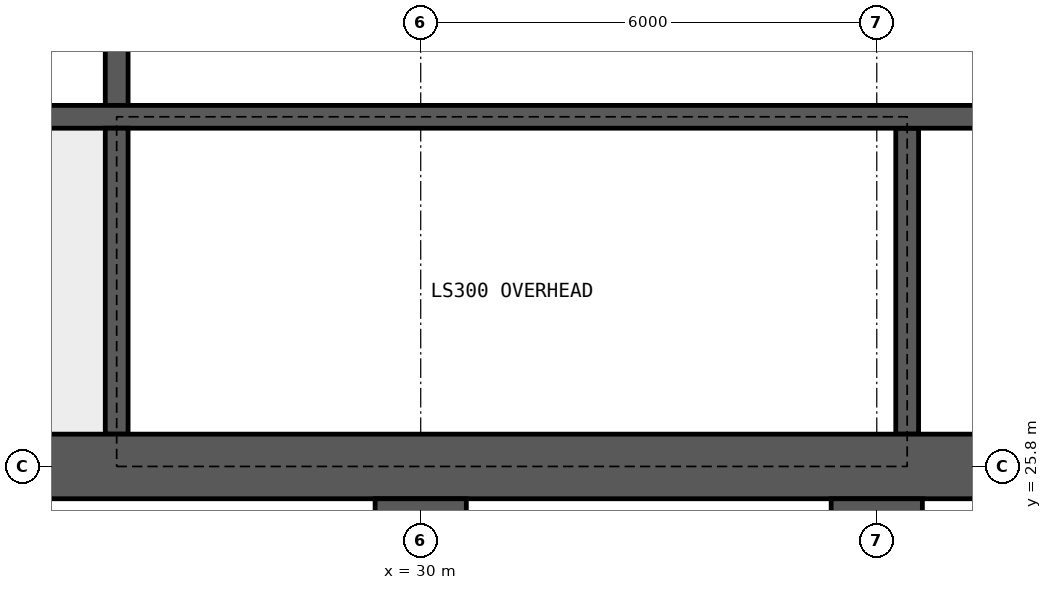
"""IFC4 building model, lengths in metres.
Left out: names, types, materials, properties, quantities, classifications, styles, units other than length and angle.
Written with IfcOpenShell. Run it as: python <this file> out.ifc"""

import sys

from ifc_helpers import new_model, si_unit, direction, frame, frame_2d, origin, place, context, subcontext, project, spatial, rectangle, extrude, element, save


model = new_model("IFC4")
c1 = context("Model", 3, precision=1e-05, world=origin(), true_north=direction((0.0, 1.0)))
c2 = subcontext(c1, "Body", "Model", "MODEL_VIEW")
j1 = project(units=[si_unit("LENGTHUNIT", "METRE"), si_unit("PLANEANGLEUNIT", "RADIAN")], contexts=[c1])
p1 = place(None, origin())
s1 = spatial("IfcSite", under=j1, at=p1, CompositionType="ELEMENT")
p2 = place(p1, origin())
s2 = spatial("IfcBuilding", under=s1, at=p2, CompositionType="ELEMENT")
p3 = place(p2, frame((0.0, 0.0, 201.1)))
s3 = spatial("IfcBuildingStorey", under=s2, at=p3, CompositionType="ELEMENT", Elevation=201.1)
p4 = place(p3, frame((18.0, 25.8, 0.0), z_axis=(0.0, 0.0, 1.0), x_axis=(1.0, 0.0, 0.0)))
e1 = element("IfcWall", 1, at=p4, inside=s3, PredefinedType="SHEAR", context=c2, shape_type="SweptSolid", body=[
    extrude(rectangle(XDim=48.0, YDim=0.85, at=frame_2d((24.0, 0.0))), origin(), (0.0, 0.0, 1.0), 7.2),
])
p5 = place(p3, frame((18.425, 30.4, 0.0), z_axis=(0.0, 0.0, 1.0), x_axis=(1.0, 0.0, 0.0)))
e2 = element("IfcWall", 2, at=p5, inside=s3, PredefinedType="SHEAR", context=c2, shape_type="SweptSolid", body=[
    extrude(rectangle(XDim=47.15, YDim=0.3, at=frame_2d((23.575, 0.0))), origin(), (0.0, 0.0, 1.0), 7.2),
])
p6 = place(p5, frame((0.4, 0.0, 0.0)))
e3 = element("IfcOpeningElement", 3, at=p6, cuts=e2, PredefinedType="OPENING", context=c2, shape_type="SweptSolid", body=[
    extrude(rectangle(XDim=1.0, YDim=2.1, at=frame_2d((0.5, 1.05))), frame((0.0, 0.16, 0.0), z_axis=(0.0, -1.0, 0.0), x_axis=(1.0, 0.0, 0.0)), (0.0, 0.0, 1.0), 0.32),
])
p7 = place(p5, frame((45.75, 0.0, 0.0)))
e4 = element("IfcOpeningElement", 4, at=p7, cuts=e2, PredefinedType="OPENING", context=c2, shape_type="SweptSolid", body=[
    extrude(rectangle(XDim=1.0, YDim=2.1, at=frame_2d((0.5, 1.05))), frame((0.0, 0.16, 0.0), z_axis=(0.0, -1.0, 0.0), x_axis=(1.0, 0.0, 0.0)), (0.0, 0.0, 1.0), 0.32),
])
p8 = place(p5, frame((18.9, 0.0, 0.0)))
e5 = element("IfcOpeningElement", 5, at=p8, cuts=e2, PredefinedType="OPENING", context=c2, shape_type="SweptSolid", body=[
    extrude(rectangle(XDim=0.9, YDim=2.1, at=frame_2d((0.45, 1.05))), frame((0.0, 0.16, 0.0), z_axis=(0.0, -1.0, 0.0), x_axis=(1.0, 0.0, 0.0)), (0.0, 0.0, 1.0), 0.32),
])
p9 = place(p5, frame((30.192, 0.0, 0.0)))
e6 = element("IfcOpeningElement", 6, at=p9, cuts=e2, PredefinedType="OPENING", context=c2, shape_type="SweptSolid", body=[
    extrude(rectangle(XDim=1.1, YDim=2.1, at=frame_2d((0.55, 1.05))), frame((0.0, 0.16, 0.0), z_axis=(0.0, -1.0, 0.0), x_axis=(1.0, 0.0, 0.0)), (0.0, 0.0, 1.0), 0.32),
])
p10 = place(p5, frame((33.725, 0.0, 0.0)))
e7 = element("IfcOpeningElement", 7, at=p10, cuts=e2, PredefinedType="OPENING", context=c2, shape_type="SweptSolid", body=[
    extrude(rectangle(XDim=1.1, YDim=2.1, at=frame_2d((0.55, 1.05))), frame((0.0, 0.16, 0.0), z_axis=(0.0, -1.0, 0.0), x_axis=(1.0, 0.0, 0.0)), (0.0, 0.0, 1.0), 0.32),
])
p11 = place(p5, frame((37.258, 0.0, 0.0)))
e8 = element("IfcOpeningElement", 8, at=p11, cuts=e2, PredefinedType="OPENING", context=c2, shape_type="SweptSolid", body=[
    extrude(rectangle(XDim=1.1, YDim=2.1, at=frame_2d((0.55, 1.05))), frame((0.0, 0.16, 0.0), z_axis=(0.0, -1.0, 0.0), x_axis=(1.0, 0.0, 0.0)), (0.0, 0.0, 1.0), 0.32),
])
p12 = place(p3, frame((26.0, 26.225, 0.0), z_axis=(0.0, 0.0, 1.0), x_axis=(0.0, 1.0, 0.0)))
e9 = element("IfcWall", 9, at=p12, inside=s3, PredefinedType="SHEAR", context=c2, shape_type="SweptSolid", body=[
    extrude(rectangle(XDim=4.025, YDim=0.3, at=frame_2d((2.012, 0.0))), origin(), (0.0, 0.0, 1.0), 7.2),
])
p13 = place(p3, frame((26.0, 30.55, 0.0), z_axis=(0.0, 0.0, 1.0), x_axis=(0.0, 1.0, 0.0)))
e10 = element("IfcWall", 10, at=p13, inside=s3, PredefinedType="SHEAR", context=c2, shape_type="SweptSolid", body=[
    extrude(rectangle(XDim=3.9, YDim=0.3, at=frame_2d((1.95, 0.0))), origin(), (0.0, 0.0, 1.0), 7.2),
])
p14 = place(p13, frame((1.4, 0.0, 0.0)))
e11 = element("IfcOpeningElement", 11, at=p14, cuts=e10, PredefinedType="OPENING", context=c2, shape_type="SweptSolid", body=[
    extrude(rectangle(XDim=1.2, YDim=2.1, at=frame_2d((0.6, 1.05))), frame((0.0, 0.16, 0.0), z_axis=(0.0, -1.0, 0.0), x_axis=(1.0, 0.0, 0.0)), (0.0, 0.0, 1.0), 0.32),
])
p15 = place(p3, frame((36.4, 26.225, 0.0), z_axis=(0.0, 0.0, 1.0), x_axis=(0.0, 1.0, 0.0)))
e12 = element("IfcWall", 12, at=p15, inside=s3, PredefinedType="SHEAR", context=c2, shape_type="SweptSolid", body=[
    extrude(rectangle(XDim=4.025, YDim=0.3, at=frame_2d((2.012, 0.0))), origin(), (0.0, 0.0, 1.0), 7.2),
])
p16 = place(p3, frame((30.0, 10.0, 0.0), z_axis=(0.0, 0.0, 1.0), x_axis=(0.0, 1.0, 0.0)))
e13 = element("IfcWall", 13, at=p16, inside=s3, PredefinedType="SHEAR", context=c2, shape_type="SweptSolid", body=[
    extrude(rectangle(XDim=15.375, YDim=1.2, at=frame_2d((7.688, 0.0))), origin(), (0.0, 0.0, 1.0), 7.2),
])
p17 = place(p16, frame((13.775, 0.0, 0.0)))
e14 = element("IfcOpeningElement", 14, at=p17, cuts=e13, PredefinedType="OPENING", context=c2, shape_type="SweptSolid", body=[
    extrude(rectangle(XDim=1.2, YDim=2.1, at=frame_2d((0.6, 1.05))), frame((0.0, 0.61, 0.0), z_axis=(0.0, -1.0, 0.0), x_axis=(1.0, 0.0, 0.0)), (0.0, 0.0, 1.0), 1.22),
])
p18 = place(p3, frame((36.0, 10.0, 0.0), z_axis=(0.0, 0.0, 1.0), x_axis=(0.0, 1.0, 0.0)))
e15 = element("IfcWall", 15, at=p18, inside=s3, PredefinedType="SHEAR", context=c2, shape_type="SweptSolid", body=[
    extrude(rectangle(XDim=15.375, YDim=1.2, at=frame_2d((7.688, 0.0))), origin(), (0.0, 0.0, 1.0), 7.2),
])
p19 = place(p18, frame((13.775, 0.0, 0.0)))
e16 = element("IfcOpeningElement", 16, at=p19, cuts=e15, PredefinedType="OPENING", context=c2, shape_type="SweptSolid", body=[
    extrude(rectangle(XDim=1.2, YDim=2.1, at=frame_2d((0.6, 1.05))), frame((0.0, 0.61, 0.0), z_axis=(0.0, -1.0, 0.0), x_axis=(1.0, 0.0, 0.0)), (0.0, 0.0, 1.0), 1.22),
])
save(model, sys.argv[1])
